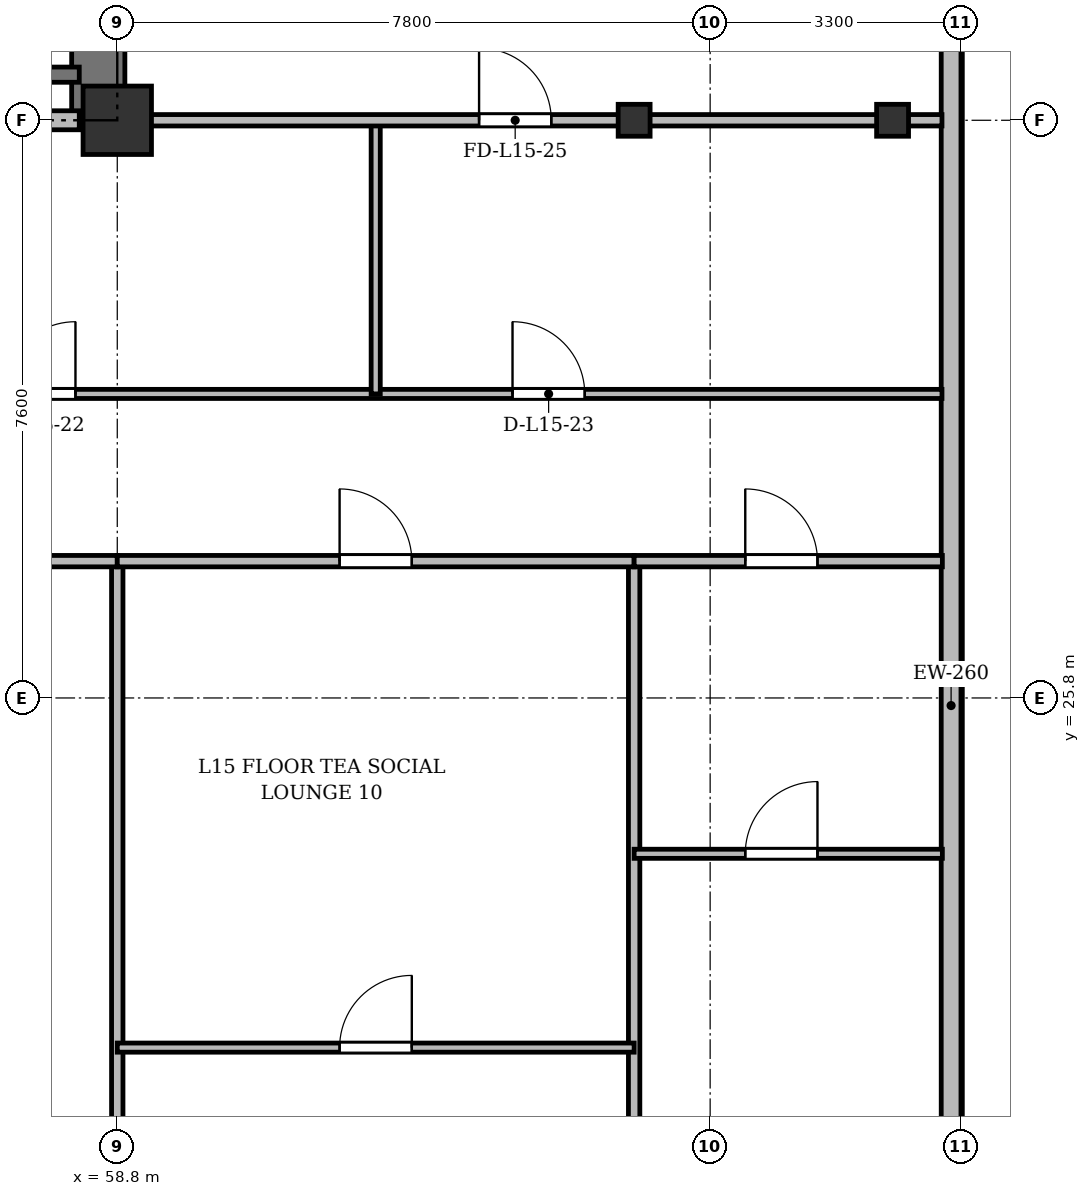
"""IFC4 building model, lengths in metres.
Left out: names, types, materials, properties, quantities, classifications, styles, units other than length and angle.
Written with IfcOpenShell. Run it as: python <this file> out.ifc"""

import sys

from ifc_helpers import new_model, si_unit, direction, frame, frame_2d, origin, origin_2d, place, context, subcontext, project, spatial, rectangle, i_section, extrude, source, transform, mapped, element, fill, save


model = new_model("IFC4")
c1 = context("Model", 3, precision=1e-05, world=origin(), true_north=direction((0.0, 1.0)))
c2 = subcontext(c1, "Body", "Model", "MODEL_VIEW")
j1 = project(units=[si_unit("LENGTHUNIT", "METRE"), si_unit("PLANEANGLEUNIT", "RADIAN")], contexts=[c1])
p1 = place(None, origin())
s1 = spatial("IfcSite", under=j1, at=p1, CompositionType="ELEMENT")
p2 = place(p1, origin())
s2 = spatial("IfcBuilding", under=s1, at=p2, CompositionType="ELEMENT")
p3 = place(p2, frame((0.0, 0.0, 59.5)))
s3 = spatial("IfcBuildingStorey", under=s2, at=p3, CompositionType="ELEMENT", Elevation=59.5)
m1 = source(origin(), c2, "Body", "SweptSolid", [
    extrude(rectangle(XDim=0.9, YDim=0.9, at=origin_2d()), origin(), (0.0, 0.0, 1.0), 3.6),
])
p4 = place(p3, frame((58.8, 33.4, 0.0), z_axis=(0.0, 0.0, 1.0), x_axis=(1.0, 0.0, 0.0)))
e1 = element("IfcColumn", 1, at=p4, inside=s3, PredefinedType="COLUMN", context=c2, shape_type="MappedRepresentation", body=[
    mapped(m1, transform((0.0, 0.0, 0.0), x_axis=(1.0, 0.0, 0.0), y_axis=(0.0, 1.0, 0.0), z_axis=(0.0, 0.0, 1.0), scale=1.0)),
])
m2 = source(origin(), c2, "Body", "SweptSolid", [
    extrude(i_section(OverallWidth=0.42, OverallDepth=0.42, WebThickness=0.026, FlangeThickness=0.04, at=origin_2d()), origin(), (0.0, 0.0, 1.0), 3.6),
])
for number, where, z_axis, x_axis in (
    (2, (65.6, 33.4, 0.0), (0.0, 0.0, 1.0), (1.0, 0.0, 0.0)),
    (3, (69.0, 33.4, 0.0), (0.0, 0.0, 1.0), (1.0, 0.0, 0.0)),
):
    element("IfcColumn", number, at=place(p3, frame(where, z_axis=z_axis, x_axis=x_axis)), inside=s3, PredefinedType="COLUMN", context=c2, shape_type="MappedRepresentation", body=[
        mapped(m2, transform((0.0, 0.0, 0.0), x_axis=(1.0, 0.0, 0.0), y_axis=(0.0, 1.0, 0.0), z_axis=(0.0, 0.0, 1.0), scale=1.0)),
    ])
p5 = place(p3, frame((69.77, 45.5, 0.0), z_axis=(0.0, 0.0, 1.0), x_axis=(0.0, -1.0, 0.0)))
e4 = element("IfcWall", 4, at=p5, inside=s3, PredefinedType="SOLIDWALL", context=c2, shape_type="SweptSolid", body=[
    extrude(rectangle(XDim=39.6, YDim=0.26, at=frame_2d((19.8, 0.0))), origin(), (0.0, 0.0, 1.0), 3.34),
])
p6 = place(p5, frame((36.95, 0.0, 0.92)))
e5 = element("IfcOpeningElement", 5, at=p6, cuts=e4, PredefinedType="OPENING", context=c2, shape_type="SweptSolid", body=[
    extrude(rectangle(XDim=1.2, YDim=1.65, at=frame_2d((0.6, 0.825))), frame((0.0, 0.14, 0.0), z_axis=(0.0, -1.0, 0.0), x_axis=(1.0, 0.0, 0.0)), (0.0, 0.0, 1.0), 0.28),
])
p7 = place(p5, frame((32.9, 0.0, 0.92)))
e6 = element("IfcOpeningElement", 6, at=p7, cuts=e4, PredefinedType="OPENING", context=c2, shape_type="SweptSolid", body=[
    extrude(rectangle(XDim=2.4, YDim=2.1, at=frame_2d((1.2, 1.05))), frame((0.0, 0.14, 0.0), z_axis=(0.0, -1.0, 0.0), x_axis=(1.0, 0.0, 0.0)), (0.0, 0.0, 1.0), 0.28),
])
p8 = place(p5, frame((28.7, 0.0, 0.92)))
e7 = element("IfcOpeningElement", 7, at=p8, cuts=e4, PredefinedType="OPENING", context=c2, shape_type="SweptSolid", body=[
    extrude(rectangle(XDim=2.4, YDim=2.1, at=frame_2d((1.2, 1.05))), frame((0.0, 0.14, 0.0), z_axis=(0.0, -1.0, 0.0), x_axis=(1.0, 0.0, 0.0)), (0.0, 0.0, 1.0), 0.28),
])
p9 = place(p5, frame((7.5, 0.0, 0.92)))
e8 = element("IfcOpeningElement", 8, at=p9, cuts=e4, PredefinedType="OPENING", context=c2, shape_type="SweptSolid", body=[
    extrude(rectangle(XDim=2.4, YDim=2.1, at=frame_2d((1.2, 1.05))), frame((0.0, 0.14, 0.0), z_axis=(0.0, -1.0, 0.0), x_axis=(1.0, 0.0, 0.0)), (0.0, 0.0, 1.0), 0.28),
])
p10 = place(p5, frame((4.5, 0.0, 0.92)))
e9 = element("IfcOpeningElement", 9, at=p10, cuts=e4, PredefinedType="OPENING", context=c2, shape_type="SweptSolid", body=[
    extrude(rectangle(XDim=1.2, YDim=1.65, at=frame_2d((0.6, 0.825))), frame((0.0, 0.14, 0.0), z_axis=(0.0, -1.0, 0.0), x_axis=(1.0, 0.0, 0.0)), (0.0, 0.0, 1.0), 0.28),
])
p11 = place(p5, frame((1.15, 0.0, 0.92)))
e10 = element("IfcOpeningElement", 10, at=p11, cuts=e4, PredefinedType="OPENING", context=c2, shape_type="SweptSolid", body=[
    extrude(rectangle(XDim=1.2, YDim=1.65, at=frame_2d((0.6, 0.825))), frame((0.0, 0.14, 0.0), z_axis=(0.0, -1.0, 0.0), x_axis=(1.0, 0.0, 0.0)), (0.0, 0.0, 1.0), 0.28),
])
p12 = place(p3, frame((58.55, 33.4, 0.0), z_axis=(0.0, 0.0, 1.0), x_axis=(0.0, 1.0, 0.0)))
e11 = element("IfcWall", 11, at=p12, inside=s3, PredefinedType="SHEAR", context=c2, shape_type="SweptSolid", body=[
    extrude(rectangle(XDim=11.7, YDim=0.7, at=frame_2d((5.85, 0.0))), origin(), (0.0, 0.0, 1.0), 3.34),
])
p13 = place(p3, frame((54.9, 34.0, 0.0), z_axis=(0.0, 0.0, 1.0), x_axis=(1.0, 0.0, 0.0)))
e12 = element("IfcWall", 12, at=p13, inside=s3, PredefinedType="SHEAR", context=c2, shape_type="SweptSolid", body=[
    extrude(rectangle(XDim=3.4, YDim=0.2, at=frame_2d((1.7, 0.0))), origin(), (0.0, 0.0, 1.0), 3.34),
])
p14 = place(p3, frame((47.15, 33.4, 0.0), z_axis=(0.0, 0.0, 1.0), x_axis=(1.0, 0.0, 0.0)))
e13 = element("IfcWall", 13, at=p14, inside=s3, PredefinedType="PARTITIONING", context=c2, shape_type="SweptSolid", body=[
    extrude(rectangle(XDim=11.15, YDim=0.25, at=frame_2d((5.575, 0.0))), origin(), (0.0, 0.0, 1.0), 2.69),
])
p15 = place(p14, frame((0.7, 0.0, 0.0)))
e14 = element("IfcOpeningElement", 14, at=p15, cuts=e13, PredefinedType="OPENING", context=c2, shape_type="SweptSolid", body=[
    extrude(rectangle(XDim=0.95, YDim=2.15, at=frame_2d((0.475, 1.075))), frame((0.0, 0.135, 0.0), z_axis=(0.0, -1.0, 0.0), x_axis=(1.0, 0.0, 0.0)), (0.0, 0.0, 1.0), 0.27),
])
p16 = place(p14, frame((6.0, 0.0, 0.0)))
e15 = element("IfcOpeningElement", 15, at=p16, cuts=e13, PredefinedType="OPENING", context=c2, shape_type="SweptSolid", body=[
    extrude(rectangle(XDim=1.2, YDim=2.15, at=frame_2d((0.6, 1.075))), frame((0.0, 0.135, 0.0), z_axis=(0.0, -1.0, 0.0), x_axis=(1.0, 0.0, 0.0)), (0.0, 0.0, 1.0), 0.27),
])
p17 = place(p3, frame((54.8, 29.8, 0.0), z_axis=(0.0, 0.0, 1.0), x_axis=(1.0, 0.0, 0.0)))
e16 = element("IfcWall", 16, at=p17, inside=s3, PredefinedType="PARTITIONING", context=c2, shape_type="SweptSolid", body=[
    extrude(rectangle(XDim=14.85, YDim=0.12, at=frame_2d((7.425, 0.0))), origin(), (0.0, 0.0, 1.0), 2.752),
])
p18 = place(p17, frame((2.5, 0.0, 0.0)))
e17 = element("IfcOpeningElement", 17, at=p18, cuts=e16, PredefinedType="OPENING", context=c2, shape_type="SweptSolid", body=[
    extrude(rectangle(XDim=0.95, YDim=2.15, at=frame_2d((0.475, 1.075))), frame((0.0, 0.07, 0.0), z_axis=(0.0, -1.0, 0.0), x_axis=(1.0, 0.0, 0.0)), (0.0, 0.0, 1.0), 0.14),
])
p19 = place(p17, frame((9.2, 0.0, 0.0)))
e18 = element("IfcOpeningElement", 18, at=p19, cuts=e16, PredefinedType="OPENING", context=c2, shape_type="SweptSolid", body=[
    extrude(rectangle(XDim=0.95, YDim=2.15, at=frame_2d((0.475, 1.075))), frame((0.0, 0.07, 0.0), z_axis=(0.0, -1.0, 0.0), x_axis=(1.0, 0.0, 0.0)), (0.0, 0.0, 1.0), 0.14),
])
p20 = place(p3, frame((62.2, 29.8, 0.0), z_axis=(0.0, 0.0, 1.0), x_axis=(0.0, 1.0, 0.0)))
e19 = element("IfcWall", 19, at=p20, inside=s3, PredefinedType="PARTITIONING", context=c2, shape_type="SweptSolid", body=[
    extrude(rectangle(XDim=3.6, YDim=0.12, at=frame_2d((1.8, 0.0))), origin(), (0.0, 0.0, 1.0), 2.69),
])
p21 = place(p3, frame((58.8, 33.4, 0.0), z_axis=(0.0, 0.0, 1.0), x_axis=(1.0, 0.0, 0.0)))
e20 = element("IfcWall", 20, at=p21, inside=s3, PredefinedType="PARTITIONING", context=c2, shape_type="SweptSolid", body=[
    extrude(rectangle(XDim=10.85, YDim=0.15, at=frame_2d((5.425, 0.0))), origin(), (0.0, 0.0, 1.0), 2.69),
])
p22 = place(p21, frame((4.76, 0.0, 0.0)))
e21 = element("IfcOpeningElement", 21, at=p22, cuts=e20, PredefinedType="OPENING", context=c2, shape_type="SweptSolid", body=[
    extrude(rectangle(XDim=0.95, YDim=2.15, at=frame_2d((0.475, 1.075))), frame((0.0, 0.085, 0.0), z_axis=(0.0, -1.0, 0.0), x_axis=(1.0, 0.0, 0.0)), (0.0, 0.0, 1.0), 0.17),
])
for number, where, z_axis, x_axis in (
    (22, (58.8, 3.145, 0.0), (0.0, 0.0, 1.0), (0.0, 1.0, 0.0)),
    (23, (65.6, 3.145, 0.0), (0.0, 0.0, 1.0), (0.0, 1.0, 0.0)),
):
    element("IfcWall", number, at=place(p3, frame(where, z_axis=z_axis, x_axis=x_axis)), inside=s3, PredefinedType="PARTITIONING", context=c2, shape_type="SweptSolid", body=[
        extrude(rectangle(XDim=24.455, YDim=0.15, at=frame_2d((12.228, 0.0))), origin(), (0.0, 0.0, 1.0), 2.752),
    ])
p23 = place(p3, frame((51.0, 27.6, 0.0), z_axis=(0.0, 0.0, 1.0), x_axis=(1.0, 0.0, 0.0)))
e24 = element("IfcWall", 24, at=p23, inside=s3, PredefinedType="PARTITIONING", context=c2, shape_type="SweptSolid", body=[
    extrude(rectangle(XDim=7.8, YDim=0.15, at=frame_2d((3.9, 0.0))), origin(), (0.0, 0.0, 1.0), 2.752),
])
p24 = place(p23, frame((5.172, 0.0, 0.0)))
e25 = element("IfcOpeningElement", 25, at=p24, cuts=e24, PredefinedType="OPENING", context=c2, shape_type="SweptSolid", body=[
    extrude(rectangle(XDim=0.95, YDim=2.15, at=frame_2d((0.475, 1.075))), frame((0.0, 0.085, 0.0), z_axis=(0.0, -1.0, 0.0), x_axis=(1.0, 0.0, 0.0)), (0.0, 0.0, 1.0), 0.17),
])
p25 = place(p3, frame((58.8, 27.6, 0.0), z_axis=(0.0, 0.0, 1.0), x_axis=(1.0, 0.0, 0.0)))
e26 = element("IfcWall", 26, at=p25, inside=s3, PredefinedType="PARTITIONING", context=c2, shape_type="SweptSolid", body=[
    extrude(rectangle(XDim=6.8, YDim=0.15, at=frame_2d((3.4, 0.0))), origin(), (0.0, 0.0, 1.0), 2.752),
])
p26 = place(p25, frame((2.925, 0.0, 0.0)))
e27 = element("IfcOpeningElement", 27, at=p26, cuts=e26, PredefinedType="OPENING", context=c2, shape_type="SweptSolid", body=[
    extrude(rectangle(XDim=0.95, YDim=2.15, at=frame_2d((0.475, 1.075))), frame((0.0, 0.085, 0.0), z_axis=(0.0, -1.0, 0.0), x_axis=(1.0, 0.0, 0.0)), (0.0, 0.0, 1.0), 0.17),
])
p27 = place(p3, frame((58.8, 21.2, 0.0), z_axis=(0.0, 0.0, 1.0), x_axis=(1.0, 0.0, 0.0)))
e28 = element("IfcWall", 28, at=p27, inside=s3, PredefinedType="PARTITIONING", context=c2, shape_type="SweptSolid", body=[
    extrude(rectangle(XDim=6.8, YDim=0.12, at=frame_2d((3.4, 0.0))), origin(), (0.0, 0.0, 1.0), 2.752),
])
p28 = place(p27, frame((2.925, 0.0, 0.0)))
e29 = element("IfcOpeningElement", 29, at=p28, cuts=e28, PredefinedType="OPENING", context=c2, shape_type="SweptSolid", body=[
    extrude(rectangle(XDim=0.95, YDim=2.15, at=frame_2d((0.475, 1.075))), frame((0.0, 0.07, 0.0), z_axis=(0.0, -1.0, 0.0), x_axis=(1.0, 0.0, 0.0)), (0.0, 0.0, 1.0), 0.14),
])
p29 = place(p3, frame((65.6, 27.6, 0.0), z_axis=(0.0, 0.0, 1.0), x_axis=(1.0, 0.0, 0.0)))
e30 = element("IfcWall", 30, at=p29, inside=s3, PredefinedType="PARTITIONING", context=c2, shape_type="SweptSolid", body=[
    extrude(rectangle(XDim=4.055, YDim=0.15, at=frame_2d((2.027, 0.0))), origin(), (0.0, 0.0, 1.0), 2.752),
])
p30 = place(p29, frame((1.462, 0.0, 0.0)))
e31 = element("IfcOpeningElement", 31, at=p30, cuts=e30, PredefinedType="OPENING", context=c2, shape_type="SweptSolid", body=[
    extrude(rectangle(XDim=0.95, YDim=2.15, at=frame_2d((0.475, 1.075))), frame((0.0, 0.085, 0.0), z_axis=(0.0, -1.0, 0.0), x_axis=(1.0, 0.0, 0.0)), (0.0, 0.0, 1.0), 0.17),
])
p31 = place(p3, frame((65.6, 23.75, 0.0), z_axis=(0.0, 0.0, 1.0), x_axis=(1.0, 0.0, 0.0)))
e32 = element("IfcWall", 32, at=p31, inside=s3, PredefinedType="PARTITIONING", context=c2, shape_type="SweptSolid", body=[
    extrude(rectangle(XDim=4.055, YDim=0.12, at=frame_2d((2.027, 0.0))), origin(), (0.0, 0.0, 1.0), 2.752),
])
p32 = place(p31, frame((1.462, 0.0, 0.0)))
e33 = element("IfcOpeningElement", 33, at=p32, cuts=e32, PredefinedType="OPENING", context=c2, shape_type="SweptSolid", body=[
    extrude(rectangle(XDim=0.95, YDim=2.15, at=frame_2d((0.475, 1.075))), frame((0.0, 0.07, 0.0), z_axis=(0.0, -1.0, 0.0), x_axis=(1.0, 0.0, 0.0)), (0.0, 0.0, 1.0), 0.14),
])
m3 = source(origin(), c2, "Body", "SweptSolid", [
    extrude(rectangle(XDim=0.95, YDim=2.15, at=frame_2d((0.475, 1.075))), frame((0.0, 0.025, 0.0), z_axis=(0.0, -1.0, 0.0), x_axis=(1.0, 0.0, 0.0)), (0.0, 0.0, 1.0), 0.05),
])
p33 = place(p18, origin())
e34 = element("IfcDoor", 34, at=p33, inside=s3, OperationType="SINGLE_SWING_RIGHT", PredefinedType="DOOR", context=c2, shape_type="MappedRepresentation", body=[
    mapped(m3, transform((0.0, 0.0, 0.0), x_axis=(1.0, 0.0, 0.0), y_axis=(0.0, 1.0, 0.0), z_axis=(0.0, 0.0, 1.0), scale=1.0)),
])
fill(e17, e34)
p34 = place(p19, origin())
e35 = element("IfcDoor", 35, at=p34, inside=s3, OperationType="SINGLE_SWING_LEFT", PredefinedType="DOOR", context=c2, shape_type="MappedRepresentation", body=[
    mapped(m3, transform((0.0, 0.0, 0.0), x_axis=(1.0, 0.0, 0.0), y_axis=(0.0, 1.0, 0.0), z_axis=(0.0, 0.0, 1.0), scale=1.0)),
])
fill(e18, e35)
p35 = place(p22, origin())
e36 = element("IfcDoor", 36, at=p35, inside=s3, OperationType="SINGLE_SWING_LEFT", PredefinedType="DOOR", context=c2, shape_type="MappedRepresentation", body=[
    mapped(m3, transform((0.0, 0.0, 0.0), x_axis=(1.0, 0.0, 0.0), y_axis=(0.0, 1.0, 0.0), z_axis=(0.0, 0.0, 1.0), scale=1.0)),
])
fill(e21, e36)
p36 = place(p26, origin())
e37 = element("IfcDoor", 37, at=p36, inside=s3, OperationType="SINGLE_SWING_LEFT", PredefinedType="DOOR", context=c2, shape_type="MappedRepresentation", body=[
    mapped(m3, transform((0.0, 0.0, 0.0), x_axis=(1.0, 0.0, 0.0), y_axis=(0.0, 1.0, 0.0), z_axis=(0.0, 0.0, 1.0), scale=1.0)),
])
fill(e27, e37)
p37 = place(p28, origin())
e38 = element("IfcDoor", 38, at=p37, inside=s3, OperationType="SINGLE_SWING_RIGHT", PredefinedType="DOOR", context=c2, shape_type="MappedRepresentation", body=[
    mapped(m3, transform((0.0, 0.0, 0.0), x_axis=(1.0, 0.0, 0.0), y_axis=(0.0, 1.0, 0.0), z_axis=(0.0, 0.0, 1.0), scale=1.0)),
])
fill(e29, e38)
p38 = place(p30, origin())
e39 = element("IfcDoor", 39, at=p38, inside=s3, OperationType="SINGLE_SWING_LEFT", PredefinedType="DOOR", context=c2, shape_type="MappedRepresentation", body=[
    mapped(m3, transform((0.0, 0.0, 0.0), x_axis=(1.0, 0.0, 0.0), y_axis=(0.0, 1.0, 0.0), z_axis=(0.0, 0.0, 1.0), scale=1.0)),
])
fill(e31, e39)
p39 = place(p32, origin())
e40 = element("IfcDoor", 40, at=p39, inside=s3, OperationType="SINGLE_SWING_RIGHT", PredefinedType="DOOR", context=c2, shape_type="MappedRepresentation", body=[
    mapped(m3, transform((0.0, 0.0, 0.0), x_axis=(1.0, 0.0, 0.0), y_axis=(0.0, 1.0, 0.0), z_axis=(0.0, 0.0, 1.0), scale=1.0)),
])
fill(e33, e40)
save(model, sys.argv[1])
